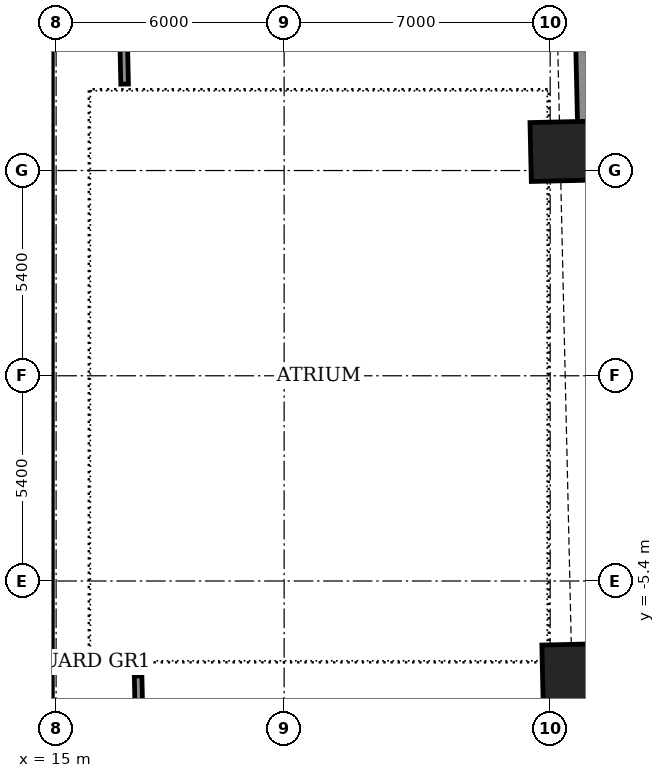
"""IFC4 building model, lengths in metres.
Left out: names, types, materials, properties, quantities, classifications, styles, units other than length and angle.
Written with IfcOpenShell. Run it as: python <this file> out.ifc"""

import sys

from ifc_helpers import new_model, si_unit, direction, frame, frame_2d, origin, origin_2d, place, context, subcontext, project, spatial, rectangle, extrude, element, save


model = new_model("IFC4")
c1 = context("Model", 3, precision=1e-05, world=origin(), true_north=direction((0.0, 1.0)))
c2 = subcontext(c1, "Body", "Model", "MODEL_VIEW")
j1 = project(units=[si_unit("LENGTHUNIT", "METRE"), si_unit("PLANEANGLEUNIT", "RADIAN")], contexts=[c1])
p1 = place(None, origin())
s1 = spatial("IfcSite", under=j1, at=p1, CompositionType="ELEMENT")
p2 = place(p1, origin())
s2 = spatial("IfcBuilding", under=s1, at=p2, CompositionType="ELEMENT")
p3 = place(p2, frame((0.0, 0.0, 41.3)))
s3 = spatial("IfcBuildingStorey", under=s2, at=p3, CompositionType="ELEMENT", Elevation=41.3)
for number, where, z_axis, x_axis in (
    (1, (28.573, -7.843, -0.55), (0.0, 0.0, 1.0), (-0.023, 1.0, 0.0)),
    (2, (28.261, 5.904, -0.55), (0.0, 0.0, 1.0), (-0.023, 1.0, 0.0)),
):
    element("IfcColumn", number, at=place(p3, frame(where, z_axis=z_axis, x_axis=x_axis)), inside=s3, PredefinedType="COLUMN", context=c2, shape_type="SweptSolid", body=[
        extrude(rectangle(XDim=1.55, YDim=1.55, at=origin_2d()), origin(), (0.0, 0.0, 1.0), 3.6),
    ])
p4 = place(p3, frame((28.887, 5.864, 0.0), z_axis=(0.0, 0.0, 1.0), x_axis=(-0.022687182773, 0.999742612745, 0.0)))
e3 = element("IfcWall", 3, at=p4, inside=s3, PredefinedType="SOLIDWALL", context=c2, shape_type="SweptSolid", body=[
    extrude(rectangle(XDim=16.529, YDim=0.3, at=frame_2d((8.265, 0.0))), origin(), (0.0, 0.0, 1.0), 3.05),
])
p5 = place(p4, frame((2.929, 0.0, 0.0)))
e4 = element("IfcOpeningElement", 4, at=p5, cuts=e3, PredefinedType="OPENING", context=c2, shape_type="SweptSolid", body=[
    extrude(rectangle(XDim=1.5, YDim=2.4, at=frame_2d((0.75, 1.2))), frame((0.0, 0.16, 0.0), z_axis=(0.0, -1.0, 0.0), x_axis=(1.0, 0.0, 0.0)), (0.0, 0.0, 1.0), 0.32),
])
p6 = place(p4, frame((7.629, 0.0, 0.9)))
e5 = element("IfcOpeningElement", 5, at=p6, cuts=e3, PredefinedType="OPENING", context=c2, shape_type="SweptSolid", body=[
    extrude(rectangle(XDim=0.9, YDim=1.5, at=frame_2d((0.45, 0.75))), frame((0.0, 0.16, 0.0), z_axis=(0.0, -1.0, 0.0), x_axis=(1.0, 0.0, 0.0)), (0.0, 0.0, 1.0), 0.32),
])
p7 = place(p4, frame((12.329, 0.0, 0.9)))
e6 = element("IfcOpeningElement", 6, at=p7, cuts=e3, PredefinedType="OPENING", context=c2, shape_type="SweptSolid", body=[
    extrude(rectangle(XDim=2.4, YDim=1.5, at=frame_2d((1.2, 0.75))), frame((0.0, 0.16, 0.0), z_axis=(0.0, -1.0, 0.0), x_axis=(1.0, 0.0, 0.0)), (0.0, 0.0, 1.0), 0.32),
])
p8 = place(p3, frame((17.311, -14.724, 0.0), z_axis=(0.0, 0.0, 1.0), x_axis=(-0.022562209343, 0.999745440955, 0.0)))
e7 = element("IfcWall", 7, at=p8, inside=s3, PredefinedType="PARTITIONING", context=c2, shape_type="SweptSolid", body=[
    extrude(rectangle(XDim=6.828, YDim=0.2, at=frame_2d((3.414, 0.0))), origin(), (0.0, 0.0, 1.0), 3.05),
])
p9 = place(p3, frame((16.803, 7.675, 0.0), z_axis=(0.0, 0.0, 1.0), x_axis=(-0.022667483124, 0.999743059595, 0.0)))
e8 = element("IfcWall", 8, at=p9, inside=s3, PredefinedType="PARTITIONING", context=c2, shape_type="SweptSolid", body=[
    extrude(rectangle(XDim=5.245, YDim=0.2, at=frame_2d((2.623, 0.0))), origin(), (0.0, 0.0, 1.0), 3.05),
])
p10 = place(p3, frame((14.35, -10.8, 0.0), z_axis=(0.0, 0.0, 1.0), x_axis=(0.0, 1.0, 0.0)))
e9 = element("IfcWall", 9, at=p10, inside=s3, PredefinedType="SHEAR", context=c2, shape_type="SweptSolid", body=[
    extrude(rectangle(XDim=21.6, YDim=1.1, at=frame_2d((10.8, 0.0))), origin(), (0.0, 0.0, 1.0), 3.6),
])
p11 = place(p10, frame((1.2, 0.0, 0.0)))
e10 = element("IfcOpeningElement", 10, at=p11, cuts=e9, PredefinedType="OPENING", context=c2, shape_type="SweptSolid", body=[
    extrude(rectangle(XDim=1.2, YDim=2.1, at=frame_2d((0.6, 1.05))), frame((0.0, 0.56, 0.0), z_axis=(0.0, -1.0, 0.0), x_axis=(1.0, 0.0, 0.0)), (0.0, 0.0, 1.0), 1.12),
])
save(model, sys.argv[1])
